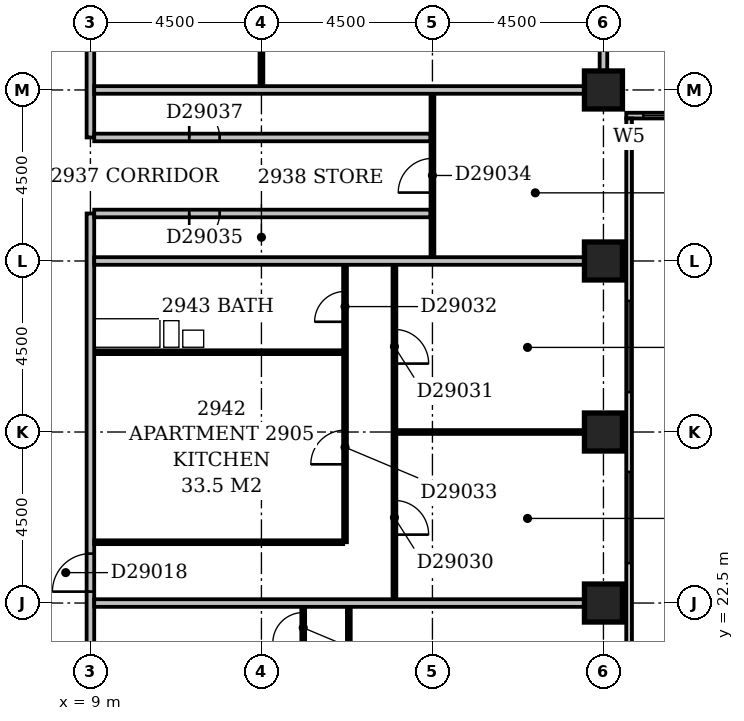
"""IFC4 building model, lengths in metres.
Left out: names, types, materials, properties, quantities, classifications, styles, units other than length and angle.
Written with IfcOpenShell. Run it as: python <this file> out.ifc"""

import sys

from ifc_helpers import new_model, si_unit, direction, frame, frame_2d, origin, origin_2d, place, context, subcontext, project, spatial, rectangle, extrude, element, fill, save


model = new_model("IFC4")
c1 = context("Model", 3, precision=1e-05, world=origin(), true_north=direction((0.0, 1.0)))
c2 = subcontext(c1, "Body", "Model", "MODEL_VIEW")
j1 = project(units=[si_unit("LENGTHUNIT", "METRE"), si_unit("PLANEANGLEUNIT", "RADIAN")], contexts=[c1])
p1 = place(None, origin())
s1 = spatial("IfcSite", under=j1, at=p1, CompositionType="ELEMENT")
p2 = place(p1, origin())
s2 = spatial("IfcBuilding", under=s1, at=p2, CompositionType="ELEMENT")
p3 = place(p2, frame((0.0, 0.0, 119.6)))
s3 = spatial("IfcBuildingStorey", under=s2, at=p3, CompositionType="ELEMENT", Elevation=119.6)
for number, where, z_axis, x_axis in (
    (1, (22.5, 22.5, -0.3), (0.0, 0.0, 1.0), (1.0, 0.0, 0.0)),
    (2, (22.5, 27.0, -0.3), (0.0, 0.0, 1.0), (1.0, 0.0, 0.0)),
    (3, (22.5, 31.5, -0.3), (0.0, 0.0, 1.0), (1.0, 0.0, 0.0)),
    (4, (22.5, 36.0, -0.3), (0.0, 0.0, 1.0), (1.0, 0.0, 0.0)),
):
    element("IfcColumn", number, at=place(p3, frame(where, z_axis=z_axis, x_axis=x_axis)), inside=s3, PredefinedType="COLUMN", context=c2, shape_type="SweptSolid", body=[
        extrude(rectangle(XDim=1.0, YDim=1.0, at=origin_2d()), origin(), (0.0, 0.0, 1.0), 3.6),
    ])
p4 = place(p3, frame((23.175, 17.4, 0.0), z_axis=(0.0, 0.0, 1.0), x_axis=(0.0, 1.0, 0.0)))
e5 = element("IfcWall", 5, at=p4, inside=s3, PredefinedType="STANDARD", context=c2, shape_type="SweptSolid", body=[
    extrude(rectangle(XDim=17.85, YDim=0.15, at=frame_2d((8.925, 0.0))), origin(), (0.0, 0.0, 1.0), 2.7),
])
p5 = place(p4, frame((1.65, 0.0, 0.6)))
e6 = element("IfcOpeningElement", 6, at=p5, cuts=e5, PredefinedType="OPENING", context=c2, shape_type="SweptSolid", body=[
    extrude(rectangle(XDim=2.4, YDim=1.8, at=frame_2d((1.2, 0.9))), frame((0.0, 0.087, 0.0), z_axis=(0.0, -1.0, 0.0), x_axis=(1.0, 0.0, 0.0)), (0.0, 0.0, 1.0), 0.174),
])
p6 = place(p4, frame((6.15, 0.0, 0.6)))
e7 = element("IfcOpeningElement", 7, at=p6, cuts=e5, PredefinedType="OPENING", context=c2, shape_type="SweptSolid", body=[
    extrude(rectangle(XDim=2.4, YDim=1.8, at=frame_2d((1.2, 0.9))), frame((0.0, 0.087, 0.0), z_axis=(0.0, -1.0, 0.0), x_axis=(1.0, 0.0, 0.0)), (0.0, 0.0, 1.0), 0.174),
])
p7 = place(p4, frame((10.65, 0.0, 0.6)))
e8 = element("IfcOpeningElement", 8, at=p7, cuts=e5, PredefinedType="OPENING", context=c2, shape_type="SweptSolid", body=[
    extrude(rectangle(XDim=2.4, YDim=1.8, at=frame_2d((1.2, 0.9))), frame((0.0, 0.087, 0.0), z_axis=(0.0, -1.0, 0.0), x_axis=(1.0, 0.0, 0.0)), (0.0, 0.0, 1.0), 0.174),
])
p8 = place(p4, frame((17.13, 0.0, 0.6)))
e9 = element("IfcOpeningElement", 9, at=p8, cuts=e5, PredefinedType="OPENING", context=c2, shape_type="SweptSolid", body=[
    extrude(rectangle(XDim=0.45, YDim=1.8, at=frame_2d((0.225, 0.9))), frame((0.0, 0.087, 0.0), z_axis=(0.0, -1.0, 0.0), x_axis=(1.0, 0.0, 0.0)), (0.0, 0.0, 1.0), 0.174),
])
p9 = place(p3, frame((23.1, 35.325, 0.0), z_axis=(0.0, 0.0, 1.0), x_axis=(1.0, 0.0, 0.0)))
e10 = element("IfcWall", 10, at=p9, inside=s3, PredefinedType="STANDARD", context=c2, shape_type="SweptSolid", body=[
    extrude(rectangle(XDim=45.15, YDim=0.15, at=frame_2d((22.575, 0.0))), origin(), (0.0, 0.0, 1.0), 2.7),
])
p10 = place(p9, frame((0.45, 0.0, 0.6)))
e11 = element("IfcOpeningElement", 11, at=p10, cuts=e10, PredefinedType="OPENING", context=c2, shape_type="SweptSolid", body=[
    extrude(rectangle(XDim=2.4, YDim=1.8, at=frame_2d((1.2, 0.9))), frame((0.0, 0.087, 0.0), z_axis=(0.0, -1.0, 0.0), x_axis=(1.0, 0.0, 0.0)), (0.0, 0.0, 1.0), 0.174),
])
p11 = place(p9, frame((4.95, 0.0, 0.6)))
e12 = element("IfcOpeningElement", 12, at=p11, cuts=e10, PredefinedType="OPENING", context=c2, shape_type="SweptSolid", body=[
    extrude(rectangle(XDim=2.4, YDim=1.8, at=frame_2d((1.2, 0.9))), frame((0.0, 0.087, 0.0), z_axis=(0.0, -1.0, 0.0), x_axis=(1.0, 0.0, 0.0)), (0.0, 0.0, 1.0), 0.174),
])
p12 = place(p9, frame((9.225, 0.0, 0.6)))
e13 = element("IfcOpeningElement", 13, at=p12, cuts=e10, PredefinedType="OPENING", context=c2, shape_type="SweptSolid", body=[
    extrude(rectangle(XDim=1.5, YDim=1.8, at=frame_2d((0.75, 0.9))), frame((0.0, 0.087, 0.0), z_axis=(0.0, -1.0, 0.0), x_axis=(1.0, 0.0, 0.0)), (0.0, 0.0, 1.0), 0.174),
])
p13 = place(p9, frame((15.146, 0.0, 0.6)))
e14 = element("IfcOpeningElement", 14, at=p13, cuts=e10, PredefinedType="OPENING", context=c2, shape_type="SweptSolid", body=[
    extrude(rectangle(XDim=1.5, YDim=1.8, at=frame_2d((0.75, 0.9))), frame((0.0, 0.087, 0.0), z_axis=(0.0, -1.0, 0.0), x_axis=(1.0, 0.0, 0.0)), (0.0, 0.0, 1.0), 0.174),
])
p14 = place(p9, frame((18.45, 0.0, 0.6)))
e15 = element("IfcOpeningElement", 15, at=p14, cuts=e10, PredefinedType="OPENING", context=c2, shape_type="SweptSolid", body=[
    extrude(rectangle(XDim=2.4, YDim=1.8, at=frame_2d((1.2, 0.9))), frame((0.0, 0.087, 0.0), z_axis=(0.0, -1.0, 0.0), x_axis=(1.0, 0.0, 0.0)), (0.0, 0.0, 1.0), 0.174),
])
p15 = place(p9, frame((22.95, 0.0, 0.6)))
e16 = element("IfcOpeningElement", 16, at=p15, cuts=e10, PredefinedType="OPENING", context=c2, shape_type="SweptSolid", body=[
    extrude(rectangle(XDim=2.4, YDim=1.8, at=frame_2d((1.2, 0.9))), frame((0.0, 0.087, 0.0), z_axis=(0.0, -1.0, 0.0), x_axis=(1.0, 0.0, 0.0)), (0.0, 0.0, 1.0), 0.174),
])
p16 = place(p9, frame((27.45, 0.0, 0.6)))
e17 = element("IfcOpeningElement", 17, at=p16, cuts=e10, PredefinedType="OPENING", context=c2, shape_type="SweptSolid", body=[
    extrude(rectangle(XDim=2.4, YDim=1.8, at=frame_2d((1.2, 0.9))), frame((0.0, 0.087, 0.0), z_axis=(0.0, -1.0, 0.0), x_axis=(1.0, 0.0, 0.0)), (0.0, 0.0, 1.0), 0.174),
])
p17 = place(p9, frame((31.95, 0.0, 0.6)))
e18 = element("IfcOpeningElement", 18, at=p17, cuts=e10, PredefinedType="OPENING", context=c2, shape_type="SweptSolid", body=[
    extrude(rectangle(XDim=2.4, YDim=1.8, at=frame_2d((1.2, 0.9))), frame((0.0, 0.087, 0.0), z_axis=(0.0, -1.0, 0.0), x_axis=(1.0, 0.0, 0.0)), (0.0, 0.0, 1.0), 0.174),
])
p18 = place(p9, frame((36.45, 0.0, 0.6)))
e19 = element("IfcOpeningElement", 19, at=p18, cuts=e10, PredefinedType="OPENING", context=c2, shape_type="SweptSolid", body=[
    extrude(rectangle(XDim=2.4, YDim=1.8, at=frame_2d((1.2, 0.9))), frame((0.0, 0.087, 0.0), z_axis=(0.0, -1.0, 0.0), x_axis=(1.0, 0.0, 0.0)), (0.0, 0.0, 1.0), 0.174),
])
p19 = place(p9, frame((40.631, 0.0, 0.6)))
e20 = element("IfcOpeningElement", 20, at=p19, cuts=e10, PredefinedType="OPENING", context=c2, shape_type="SweptSolid", body=[
    extrude(rectangle(XDim=0.9, YDim=1.8, at=frame_2d((0.45, 0.9))), frame((0.0, 0.087, 0.0), z_axis=(0.0, -1.0, 0.0), x_axis=(1.0, 0.0, 0.0)), (0.0, 0.0, 1.0), 0.174),
])
p20 = place(p3, frame((9.0, 5.0, 0.0), z_axis=(0.0, 0.0, 1.0), x_axis=(0.0, 1.0, 0.0)))
e21 = element("IfcWall", 21, at=p20, inside=s3, PredefinedType="PARTITIONING", context=c2, shape_type="SweptSolid", body=[
    extrude(rectangle(XDim=27.75, YDim=0.2, at=frame_2d((13.875, 0.0))), origin(), (0.0, 0.0, 1.0), 3.3),
])
p21 = place(p20, frame((17.8, 0.0, 0.0)))
e22 = element("IfcOpeningElement", 22, at=p21, cuts=e21, PredefinedType="OPENING", context=c2, shape_type="SweptSolid", body=[
    extrude(rectangle(XDim=1.0, YDim=2.1, at=frame_2d((0.5, 1.05))), frame((0.0, 0.112, 0.0), z_axis=(0.0, -1.0, 0.0), x_axis=(1.0, 0.0, 0.0)), (0.0, 0.0, 1.0), 0.224),
])
p22 = place(p20, frame((14.95, 0.0, 0.0)))
e23 = element("IfcOpeningElement", 23, at=p22, cuts=e21, PredefinedType="OPENING", context=c2, shape_type="SweptSolid", body=[
    extrude(rectangle(XDim=1.0, YDim=2.1, at=frame_2d((0.5, 1.05))), frame((0.0, 0.112, 0.0), z_axis=(0.0, -1.0, 0.0), x_axis=(1.0, 0.0, 0.0)), (0.0, 0.0, 1.0), 0.224),
])
p23 = place(p20, frame((9.3, 0.0, 0.0)))
e24 = element("IfcOpeningElement", 24, at=p23, cuts=e21, PredefinedType="OPENING", context=c2, shape_type="SweptSolid", body=[
    extrude(rectangle(XDim=1.0, YDim=2.1, at=frame_2d((0.5, 1.05))), frame((0.0, 0.112, 0.0), z_axis=(0.0, -1.0, 0.0), x_axis=(1.0, 0.0, 0.0)), (0.0, 0.0, 1.0), 0.224),
])
p24 = place(p20, frame((1.5, 0.0, 0.0)))
e25 = element("IfcOpeningElement", 25, at=p24, cuts=e21, PredefinedType="OPENING", context=c2, shape_type="SweptSolid", body=[
    extrude(rectangle(XDim=0.9, YDim=2.1, at=frame_2d((0.45, 1.05))), frame((0.0, 0.112, 0.0), z_axis=(0.0, -1.0, 0.0), x_axis=(1.0, 0.0, 0.0)), (0.0, 0.0, 1.0), 0.224),
])
p25 = place(p3, frame((15.8, 18.1, 0.0), z_axis=(0.0, 0.0, 1.0), x_axis=(0.0, 1.0, 0.0)))
e26 = element("IfcWall", 26, at=p25, inside=s3, PredefinedType="PARTITIONING", context=c2, shape_type="SweptSolid", body=[
    extrude(rectangle(XDim=4.3, YDim=0.1, at=frame_2d((2.15, 0.0))), origin(), (0.0, 0.0, 1.0), 3.3),
])
p26 = place(p25, frame((1.7, 0.0, 0.0)))
e27 = element("IfcOpeningElement", 27, at=p26, cuts=e26, PredefinedType="OPENING", context=c2, shape_type="SweptSolid", body=[
    extrude(rectangle(XDim=0.9, YDim=2.1, at=frame_2d((0.45, 1.05))), frame((0.0, 0.062, 0.0), z_axis=(0.0, -1.0, 0.0), x_axis=(1.0, 0.0, 0.0)), (0.0, 0.0, 1.0), 0.124),
])
p27 = place(p3, frame((14.6, 21.2, 0.0), z_axis=(0.0, 0.0, 1.0), x_axis=(0.0, 1.0, 0.0)))
e28 = element("IfcWall", 28, at=p27, inside=s3, PredefinedType="PARTITIONING", context=c2, shape_type="SweptSolid", body=[
    extrude(rectangle(XDim=1.2, YDim=0.1, at=frame_2d((0.6, 0.0))), origin(), (0.0, 0.0, 1.0), 3.3),
])
p28 = place(p27, frame((0.25, 0.0, 0.0)))
e29 = element("IfcOpeningElement", 29, at=p28, cuts=e28, PredefinedType="OPENING", context=c2, shape_type="SweptSolid", body=[
    extrude(rectangle(XDim=0.8, YDim=2.1, at=frame_2d((0.4, 1.05))), frame((0.0, 0.062, 0.0), z_axis=(0.0, -1.0, 0.0), x_axis=(1.0, 0.0, 0.0)), (0.0, 0.0, 1.0), 0.124),
])
p29 = place(p3, frame((9.1, 22.5, 0.0), z_axis=(0.0, 0.0, 1.0), x_axis=(1.0, 0.0, 0.0)))
e30 = element("IfcWall", 30, at=p29, inside=s3, PredefinedType="PARTITIONING", context=c2, shape_type="SweptSolid", body=[
    extrude(rectangle(XDim=12.9, YDim=0.2, at=frame_2d((6.45, 0.0))), origin(), (0.0, 0.0, 1.0), 3.3),
])
p30 = place(p3, frame((17.0, 22.6, 0.0), z_axis=(0.0, 0.0, 1.0), x_axis=(0.0, 1.0, 0.0)))
e31 = element("IfcWall", 31, at=p30, inside=s3, PredefinedType="PARTITIONING", context=c2, shape_type="SweptSolid", body=[
    extrude(rectangle(XDim=8.8, YDim=0.1, at=frame_2d((4.4, 0.0))), origin(), (0.0, 0.0, 1.0), 3.3),
])
p31 = place(p30, frame((1.7, 0.0, 0.0)))
e32 = element("IfcOpeningElement", 32, at=p31, cuts=e31, PredefinedType="OPENING", context=c2, shape_type="SweptSolid", body=[
    extrude(rectangle(XDim=0.9, YDim=2.1, at=frame_2d((0.45, 1.05))), frame((0.0, 0.062, 0.0), z_axis=(0.0, -1.0, 0.0), x_axis=(1.0, 0.0, 0.0)), (0.0, 0.0, 1.0), 0.124),
])
p32 = place(p30, frame((6.2, 0.0, 0.0)))
e33 = element("IfcOpeningElement", 33, at=p32, cuts=e31, PredefinedType="OPENING", context=c2, shape_type="SweptSolid", body=[
    extrude(rectangle(XDim=0.9, YDim=2.1, at=frame_2d((0.45, 1.05))), frame((0.0, 0.062, 0.0), z_axis=(0.0, -1.0, 0.0), x_axis=(1.0, 0.0, 0.0)), (0.0, 0.0, 1.0), 0.124),
])
p33 = place(p3, frame((9.1, 24.1, 0.0), z_axis=(0.0, 0.0, 1.0), x_axis=(1.0, 0.0, 0.0)))
e34 = element("IfcWall", 34, at=p33, inside=s3, PredefinedType="PARTITIONING", context=c2, shape_type="SweptSolid", body=[
    extrude(rectangle(XDim=6.55, YDim=0.1, at=frame_2d((3.275, 0.0))), origin(), (0.0, 0.0, 1.0), 3.3),
])
p34 = place(p3, frame((15.7, 24.1, 0.0), z_axis=(0.0, 0.0, 1.0), x_axis=(0.0, 1.0, 0.0)))
e35 = element("IfcWall", 35, at=p34, inside=s3, PredefinedType="PARTITIONING", context=c2, shape_type="SweptSolid", body=[
    extrude(rectangle(XDim=7.3, YDim=0.1, at=frame_2d((3.65, 0.0))), origin(), (0.0, 0.0, 1.0), 3.3),
])
p35 = place(p34, frame((5.8, 0.0, 0.0)))
e36 = element("IfcOpeningElement", 36, at=p35, cuts=e35, PredefinedType="OPENING", context=c2, shape_type="SweptSolid", body=[
    extrude(rectangle(XDim=0.8, YDim=2.1, at=frame_2d((0.4, 1.05))), frame((0.0, 0.062, 0.0), z_axis=(0.0, -1.0, 0.0), x_axis=(1.0, 0.0, 0.0)), (0.0, 0.0, 1.0), 0.124),
])
p36 = place(p34, frame((2.05, 0.0, 0.0)))
e37 = element("IfcOpeningElement", 37, at=p36, cuts=e35, PredefinedType="OPENING", context=c2, shape_type="SweptSolid", body=[
    extrude(rectangle(XDim=0.9, YDim=2.1, at=frame_2d((0.45, 1.05))), frame((0.0, 0.062, 0.0), z_axis=(0.0, -1.0, 0.0), x_axis=(1.0, 0.0, 0.0)), (0.0, 0.0, 1.0), 0.124),
])
p37 = place(p3, frame((17.05, 27.0, 0.0), z_axis=(0.0, 0.0, 1.0), x_axis=(1.0, 0.0, 0.0)))
e38 = element("IfcWall", 38, at=p37, inside=s3, PredefinedType="PARTITIONING", context=c2, shape_type="SweptSolid", body=[
    extrude(rectangle(XDim=4.95, YDim=0.1, at=frame_2d((2.475, 0.0))), origin(), (0.0, 0.0, 1.0), 2.7),
])
p38 = place(p3, frame((9.1, 29.1, 0.0), z_axis=(0.0, 0.0, 1.0), x_axis=(1.0, 0.0, 0.0)))
e39 = element("IfcWall", 39, at=p38, inside=s3, PredefinedType="PLUMBINGWALL", context=c2, shape_type="SweptSolid", body=[
    extrude(rectangle(XDim=6.55, YDim=0.1, at=frame_2d((3.275, 0.0))), origin(), (0.0, 0.0, 1.0), 3.3),
])
p39 = place(p3, frame((9.1, 31.5, 0.0), z_axis=(0.0, 0.0, 1.0), x_axis=(1.0, 0.0, 0.0)))
e40 = element("IfcWall", 40, at=p39, inside=s3, PredefinedType="PARTITIONING", context=c2, shape_type="SweptSolid", body=[
    extrude(rectangle(XDim=12.9, YDim=0.2, at=frame_2d((6.45, 0.0))), origin(), (0.0, 0.0, 1.0), 3.3),
])
p40 = place(p3, frame((18.0, 31.6, 0.0), z_axis=(0.0, 0.0, 1.0), x_axis=(0.0, 1.0, 0.0)))
e41 = element("IfcWall", 41, at=p40, inside=s3, PredefinedType="PARTITIONING", context=c2, shape_type="SweptSolid", body=[
    extrude(rectangle(XDim=4.3, YDim=0.1, at=frame_2d((2.15, 0.0))), origin(), (0.0, 0.0, 1.0), 3.3),
])
p41 = place(p40, frame((1.7, 0.0, 0.0)))
e42 = element("IfcOpeningElement", 42, at=p41, cuts=e41, PredefinedType="OPENING", context=c2, shape_type="SweptSolid", body=[
    extrude(rectangle(XDim=0.9, YDim=2.1, at=frame_2d((0.45, 1.05))), frame((0.0, 0.062, 0.0), z_axis=(0.0, -1.0, 0.0), x_axis=(1.0, 0.0, 0.0)), (0.0, 0.0, 1.0), 0.124),
])
p42 = place(p3, frame((9.1, 32.75, 0.0), z_axis=(0.0, 0.0, 1.0), x_axis=(1.0, 0.0, 0.0)))
e43 = element("IfcWall", 43, at=p42, inside=s3, PredefinedType="PARTITIONING", context=c2, shape_type="SweptSolid", body=[
    extrude(rectangle(XDim=8.85, YDim=0.2, at=frame_2d((4.425, 0.0))), origin(), (0.0, 0.0, 1.0), 3.3),
])
p43 = place(p42, frame((2.5, 0.0, 0.0)))
e44 = element("IfcOpeningElement", 44, at=p43, cuts=e43, PredefinedType="OPENING", context=c2, shape_type="SweptSolid", body=[
    extrude(rectangle(XDim=0.8, YDim=2.1, at=frame_2d((0.4, 1.05))), frame((0.0, 0.112, 0.0), z_axis=(0.0, -1.0, 0.0), x_axis=(1.0, 0.0, 0.0)), (0.0, 0.0, 1.0), 0.224),
])
p44 = place(p3, frame((9.0, 34.75, 0.0), z_axis=(0.0, 0.0, 1.0), x_axis=(0.0, 1.0, 0.0)))
e45 = element("IfcWall", 45, at=p44, inside=s3, PredefinedType="PARTITIONING", context=c2, shape_type="SweptSolid", body=[
    extrude(rectangle(XDim=14.75, YDim=0.2, at=frame_2d((7.375, 0.0))), origin(), (0.0, 0.0, 1.0), 3.3),
])
p45 = place(p44, frame((7.5, 0.0, 0.0)))
e46 = element("IfcOpeningElement", 46, at=p45, cuts=e45, PredefinedType="OPENING", context=c2, shape_type="SweptSolid", body=[
    extrude(rectangle(XDim=0.9, YDim=2.1, at=frame_2d((0.45, 1.05))), frame((0.0, 0.112, 0.0), z_axis=(0.0, -1.0, 0.0), x_axis=(1.0, 0.0, 0.0)), (0.0, 0.0, 1.0), 0.224),
])
p46 = place(p3, frame((9.1, 34.75, 0.0), z_axis=(0.0, 0.0, 1.0), x_axis=(1.0, 0.0, 0.0)))
e47 = element("IfcWall", 47, at=p46, inside=s3, PredefinedType="PARTITIONING", context=c2, shape_type="SweptSolid", body=[
    extrude(rectangle(XDim=8.85, YDim=0.2, at=frame_2d((4.425, 0.0))), origin(), (0.0, 0.0, 1.0), 3.3),
])
p47 = place(p46, frame((2.5, 0.0, 0.0)))
e48 = element("IfcOpeningElement", 48, at=p47, cuts=e47, PredefinedType="OPENING", context=c2, shape_type="SweptSolid", body=[
    extrude(rectangle(XDim=0.8, YDim=2.1, at=frame_2d((0.4, 1.05))), frame((0.0, 0.112, 0.0), z_axis=(0.0, -1.0, 0.0), x_axis=(1.0, 0.0, 0.0)), (0.0, 0.0, 1.0), 0.224),
])
p48 = place(p3, frame((9.1, 36.0, 0.0), z_axis=(0.0, 0.0, 1.0), x_axis=(1.0, 0.0, 0.0)))
e49 = element("IfcWall", 49, at=p48, inside=s3, PredefinedType="PARTITIONING", context=c2, shape_type="SweptSolid", body=[
    extrude(rectangle(XDim=12.9, YDim=0.2, at=frame_2d((6.45, 0.0))), origin(), (0.0, 0.0, 1.0), 3.3),
])
p49 = place(p3, frame((13.5, 36.1, 0.0), z_axis=(0.0, 0.0, 1.0), x_axis=(0.0, 1.0, 0.0)))
e50 = element("IfcWall", 50, at=p49, inside=s3, PredefinedType="PARTITIONING", context=c2, shape_type="SweptSolid", body=[
    extrude(rectangle(XDim=13.3, YDim=0.1, at=frame_2d((6.65, 0.0))), origin(), (0.0, 0.0, 1.0), 3.3),
])
p50 = place(p3, frame((22.5, 36.5, 0.0), z_axis=(0.0, 0.0, 1.0), x_axis=(0.0, 1.0, 0.0)))
e51 = element("IfcWall", 51, at=p50, inside=s3, PredefinedType="PARTITIONING", context=c2, shape_type="SweptSolid", body=[
    extrude(rectangle(XDim=12.9, YDim=0.2, at=frame_2d((6.45, 0.0))), origin(), (0.0, 0.0, 1.0), 3.3),
])
p51 = place(p6, origin())
e52 = element("IfcWindow", 52, at=p51, inside=s3, PartitioningType="SINGLE_PANEL", PredefinedType="WINDOW", context=c2, shape_type="SweptSolid", body=[
    extrude(rectangle(XDim=2.4, YDim=1.8, at=frame_2d((1.2, 0.9))), frame((0.0, 0.03, 0.0), z_axis=(0.0, -1.0, 0.0), x_axis=(1.0, 0.0, 0.0)), (0.0, 0.0, 1.0), 0.06),
])
fill(e7, e52)
p52 = place(p7, origin())
e53 = element("IfcWindow", 53, at=p52, inside=s3, PartitioningType="SINGLE_PANEL", PredefinedType="WINDOW", context=c2, shape_type="SweptSolid", body=[
    extrude(rectangle(XDim=2.4, YDim=1.8, at=frame_2d((1.2, 0.9))), frame((0.0, 0.03, 0.0), z_axis=(0.0, -1.0, 0.0), x_axis=(1.0, 0.0, 0.0)), (0.0, 0.0, 1.0), 0.06),
])
fill(e8, e53)
p53 = place(p8, origin())
e54 = element("IfcWindow", 54, at=p53, inside=s3, PartitioningType="SINGLE_PANEL", PredefinedType="WINDOW", context=c2, shape_type="SweptSolid", body=[
    extrude(rectangle(XDim=0.45, YDim=1.8, at=frame_2d((0.225, 0.9))), frame((0.0, 0.03, 0.0), z_axis=(0.0, -1.0, 0.0), x_axis=(1.0, 0.0, 0.0)), (0.0, 0.0, 1.0), 0.06),
])
fill(e9, e54)
p54 = place(p10, origin())
e55 = element("IfcWindow", 55, at=p54, inside=s3, PartitioningType="SINGLE_PANEL", PredefinedType="WINDOW", context=c2, shape_type="SweptSolid", body=[
    extrude(rectangle(XDim=2.4, YDim=1.8, at=frame_2d((1.2, 0.9))), frame((0.0, 0.03, 0.0), z_axis=(0.0, -1.0, 0.0), x_axis=(1.0, 0.0, 0.0)), (0.0, 0.0, 1.0), 0.06),
])
fill(e11, e55)
p55 = place(p21, origin())
e56 = element("IfcDoor", 56, at=p55, inside=s3, OperationType="SINGLE_SWING_LEFT", PredefinedType="DOOR", context=c2, shape_type="SweptSolid", body=[
    extrude(rectangle(XDim=1.0, YDim=2.1, at=frame_2d((0.5, 1.05))), frame((0.0, 0.025, 0.0), z_axis=(0.0, -1.0, 0.0), x_axis=(1.0, 0.0, 0.0)), (0.0, 0.0, 1.0), 0.05),
])
fill(e22, e56)
p56 = place(p28, origin())
e57 = element("IfcDoor", 57, at=p56, inside=s3, OperationType="SINGLE_SWING_LEFT", PredefinedType="DOOR", context=c2, shape_type="SweptSolid", body=[
    extrude(rectangle(XDim=0.8, YDim=2.1, at=frame_2d((0.4, 1.05))), frame((0.0, 0.025, 0.0), z_axis=(0.0, -1.0, 0.0), x_axis=(1.0, 0.0, 0.0)), (0.0, 0.0, 1.0), 0.05),
])
fill(e29, e57)
p57 = place(p31, frame((0.9, 0.0, 0.0), z_axis=(0.0, 0.0, 1.0), x_axis=(-1.0, 0.0, 0.0)))
e58 = element("IfcDoor", 58, at=p57, inside=s3, OperationType="SINGLE_SWING_RIGHT", PredefinedType="DOOR", context=c2, shape_type="SweptSolid", body=[
    extrude(rectangle(XDim=0.9, YDim=2.1, at=frame_2d((0.45, 1.05))), frame((0.0, 0.025, 0.0), z_axis=(0.0, -1.0, 0.0), x_axis=(1.0, 0.0, 0.0)), (0.0, 0.0, 1.0), 0.05),
])
fill(e32, e58)
p58 = place(p32, frame((0.9, 0.0, 0.0), z_axis=(0.0, 0.0, 1.0), x_axis=(-1.0, 0.0, 0.0)))
e59 = element("IfcDoor", 59, at=p58, inside=s3, OperationType="SINGLE_SWING_RIGHT", PredefinedType="DOOR", context=c2, shape_type="SweptSolid", body=[
    extrude(rectangle(XDim=0.9, YDim=2.1, at=frame_2d((0.45, 1.05))), frame((0.0, 0.025, 0.0), z_axis=(0.0, -1.0, 0.0), x_axis=(1.0, 0.0, 0.0)), (0.0, 0.0, 1.0), 0.05),
])
fill(e33, e59)
p59 = place(p35, origin())
e60 = element("IfcDoor", 60, at=p59, inside=s3, OperationType="SINGLE_SWING_LEFT", PredefinedType="DOOR", context=c2, shape_type="SweptSolid", body=[
    extrude(rectangle(XDim=0.8, YDim=2.1, at=frame_2d((0.4, 1.05))), frame((0.0, 0.025, 0.0), z_axis=(0.0, -1.0, 0.0), x_axis=(1.0, 0.0, 0.0)), (0.0, 0.0, 1.0), 0.05),
])
fill(e36, e60)
p60 = place(p36, origin())
e61 = element("IfcDoor", 61, at=p60, inside=s3, OperationType="SINGLE_SWING_LEFT", PredefinedType="DOOR", context=c2, shape_type="SweptSolid", body=[
    extrude(rectangle(XDim=0.9, YDim=2.1, at=frame_2d((0.45, 1.05))), frame((0.0, 0.025, 0.0), z_axis=(0.0, -1.0, 0.0), x_axis=(1.0, 0.0, 0.0)), (0.0, 0.0, 1.0), 0.05),
])
fill(e37, e61)
p61 = place(p41, origin())
e62 = element("IfcDoor", 62, at=p61, inside=s3, OperationType="SINGLE_SWING_LEFT", PredefinedType="DOOR", context=c2, shape_type="SweptSolid", body=[
    extrude(rectangle(XDim=0.9, YDim=2.1, at=frame_2d((0.45, 1.05))), frame((0.0, 0.025, 0.0), z_axis=(0.0, -1.0, 0.0), x_axis=(1.0, 0.0, 0.0)), (0.0, 0.0, 1.0), 0.05),
])
fill(e42, e62)
p62 = place(p43, frame((0.8, 0.0, 0.0), z_axis=(0.0, 0.0, 1.0), x_axis=(-1.0, 0.0, 0.0)))
e63 = element("IfcDoor", 63, at=p62, inside=s3, OperationType="SINGLE_SWING_RIGHT", PredefinedType="DOOR", context=c2, shape_type="SweptSolid", body=[
    extrude(rectangle(XDim=0.8, YDim=2.1, at=frame_2d((0.4, 1.05))), frame((0.0, 0.025, 0.0), z_axis=(0.0, -1.0, 0.0), x_axis=(1.0, 0.0, 0.0)), (0.0, 0.0, 1.0), 0.05),
])
fill(e44, e63)
p63 = place(p47, origin())
e64 = element("IfcDoor", 64, at=p63, inside=s3, OperationType="SINGLE_SWING_LEFT", PredefinedType="DOOR", context=c2, shape_type="SweptSolid", body=[
    extrude(rectangle(XDim=0.8, YDim=2.1, at=frame_2d((0.4, 1.05))), frame((0.0, 0.025, 0.0), z_axis=(0.0, -1.0, 0.0), x_axis=(1.0, 0.0, 0.0)), (0.0, 0.0, 1.0), 0.05),
])
fill(e48, e64)
save(model, sys.argv[1])
